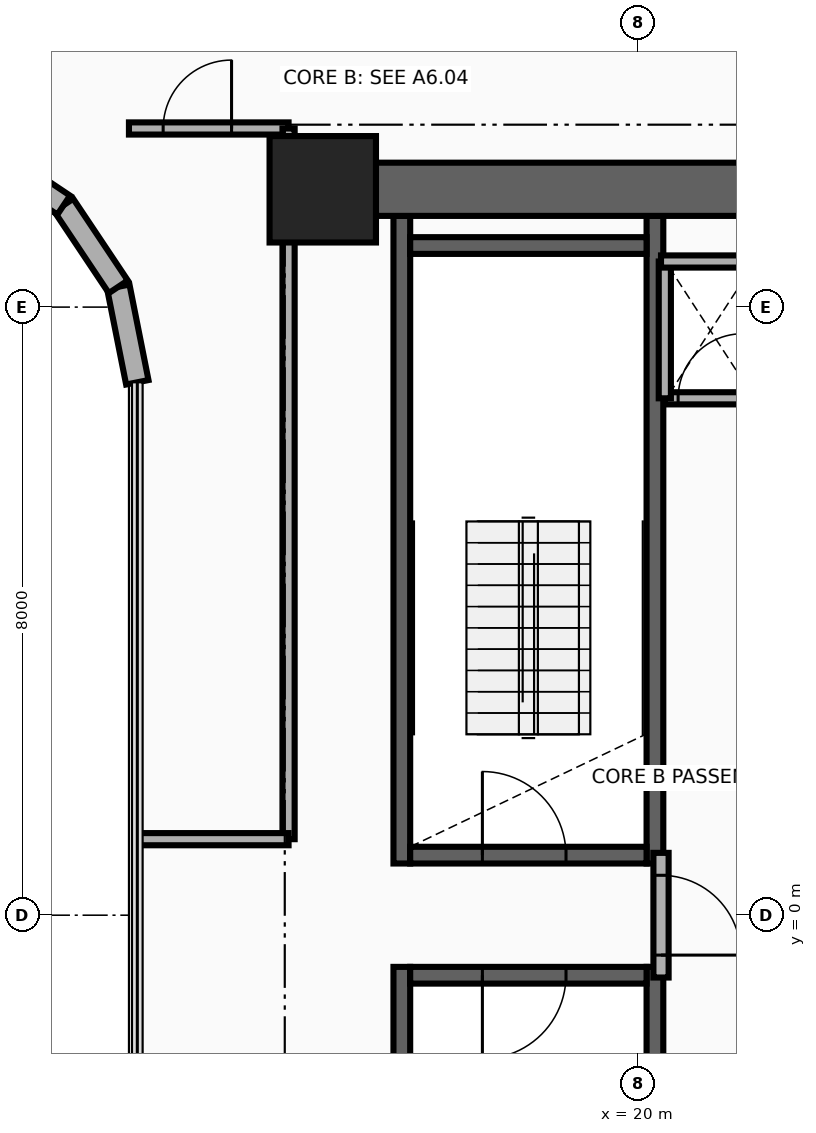
"""IFC4 building model, lengths in metres.
Left out: names, types, materials, properties, quantities, classifications, styles, units other than length and angle.
Written with IfcOpenShell. Run it as: python <this file> out.ifc"""

import sys

from ifc_helpers import new_model, si_unit, direction, frame, frame_2d, origin, origin_2d, place, context, subcontext, project, spatial, rectangle, extrude, source, transform, mapped, element, fill, save


model = new_model("IFC4")
c1 = context("Model", 3, precision=1e-05, world=origin(), true_north=direction((0.0, 1.0)))
c2 = subcontext(c1, "Body", "Model", "MODEL_VIEW")
j1 = project(units=[si_unit("LENGTHUNIT", "METRE"), si_unit("PLANEANGLEUNIT", "RADIAN")], contexts=[c1])
p1 = place(None, origin())
s1 = spatial("IfcSite", under=j1, at=p1, CompositionType="ELEMENT")
p2 = place(p1, origin())
s2 = spatial("IfcBuilding", under=s1, at=p2, CompositionType="ELEMENT")
p3 = place(p2, frame((0.0, 0.0, 37.1)))
s3 = spatial("IfcBuildingStorey", under=s2, at=p3, CompositionType="ELEMENT", Elevation=37.1)
for number, where, z_axis, x_axis in (
    (1, (16.89, 0.68, 0.0), (0.0, 0.0, 1.0), (0.0, 1.0, 0.0)),
    (2, (20.22, 0.68, 0.0), (0.0, 0.0, 1.0), (0.0, 1.0, 0.0)),
):
    element("IfcWall", number, at=place(p3, frame(where, z_axis=z_axis, x_axis=x_axis)), inside=s3, PredefinedType="SHEAR", context=c2, shape_type="SweptSolid", body=[
        extrude(rectangle(XDim=8.52, YDim=0.22, at=frame_2d((4.26, 0.0))), origin(), (0.0, 0.0, 1.0), 3.46),
    ])
p4 = place(p3, frame((17.0, 0.79, 0.0), z_axis=(0.0, 0.0, 1.0), x_axis=(1.0, 0.0, 0.0)))
e3 = element("IfcWall", 3, at=p4, inside=s3, PredefinedType="SHEAR", context=c2, shape_type="SweptSolid", body=[
    extrude(rectangle(XDim=3.11, YDim=0.22, at=frame_2d((1.555, 0.0))), origin(), (0.0, 0.0, 1.0), 3.46),
])
p5 = place(p4, frame((0.95, 0.0, 0.0)))
e4 = element("IfcOpeningElement", 4, at=p5, cuts=e3, PredefinedType="OPENING", context=c2, shape_type="SweptSolid", body=[
    extrude(rectangle(XDim=1.1, YDim=2.15, at=frame_2d((0.55, 1.075))), frame((0.0, 0.125, 0.0), z_axis=(0.0, -1.0, 0.0), x_axis=(1.0, 0.0, 0.0)), (0.0, 0.0, 1.0), 0.25),
])
p6 = place(p3, frame((17.0, 8.81, 0.0), z_axis=(0.0, 0.0, 1.0), x_axis=(1.0, 0.0, 0.0)))
e5 = element("IfcWall", 5, at=p6, inside=s3, PredefinedType="SHEAR", context=c2, shape_type="SweptSolid", body=[
    extrude(rectangle(XDim=3.11, YDim=0.22, at=frame_2d((1.555, 0.0))), origin(), (0.0, 0.0, 1.0), 3.46),
])
for number, where, z_axis, x_axis in (
    (6, (16.89, -9.2, 0.0), (0.0, 0.0, 1.0), (0.0, 1.0, 0.0)),
    (7, (20.22, -9.2, 0.0), (0.0, 0.0, 1.0), (0.0, 1.0, 0.0)),
):
    element("IfcWall", number, at=place(p3, frame(where, z_axis=z_axis, x_axis=x_axis)), inside=s3, PredefinedType="SHEAR", context=c2, shape_type="SweptSolid", body=[
        extrude(rectangle(XDim=8.52, YDim=0.22, at=frame_2d((4.26, 0.0))), origin(), (0.0, 0.0, 1.0), 3.46),
    ])
p7 = place(p3, frame((17.0, -0.79, 0.0), z_axis=(0.0, 0.0, 1.0), x_axis=(1.0, 0.0, 0.0)))
e8 = element("IfcWall", 8, at=p7, inside=s3, PredefinedType="SHEAR", context=c2, shape_type="SweptSolid", body=[
    extrude(rectangle(XDim=3.11, YDim=0.22, at=frame_2d((1.555, 0.0))), origin(), (0.0, 0.0, 1.0), 3.46),
])
p8 = place(p7, frame((0.95, 0.0, 0.0)))
e9 = element("IfcOpeningElement", 9, at=p8, cuts=e8, PredefinedType="OPENING", context=c2, shape_type="SweptSolid", body=[
    extrude(rectangle(XDim=1.1, YDim=2.15, at=frame_2d((0.55, 1.075))), frame((0.0, 0.125, 0.0), z_axis=(0.0, -1.0, 0.0), x_axis=(1.0, 0.0, 0.0)), (0.0, 0.0, 1.0), 0.25),
])
p9 = place(p3, frame((15.85, 9.55, 0.0), z_axis=(0.0, 0.0, 1.0), x_axis=(1.0, 0.0, 0.0)))
e10 = element("IfcWall", 10, at=p9, inside=s3, PredefinedType="SHEAR", context=c2, shape_type="SweptSolid", body=[
    extrude(rectangle(XDim=9.0, YDim=0.7, at=frame_2d((4.5, 0.0))), origin(), (0.0, 0.0, 1.0), 3.46),
])
m1 = source(origin(), c2, "Body", "SweptSolid", [
    extrude(rectangle(XDim=1.4, YDim=1.4, at=origin_2d()), origin(), (0.0, 0.0, 1.0), 3.7),
])
p10 = place(p3, frame((15.85, 9.55, 0.0), z_axis=(0.0, 0.0, 1.0), x_axis=(1.0, 0.0, 0.0)))
e11 = element("IfcColumn", 11, at=p10, inside=s3, PredefinedType="COLUMN", context=c2, shape_type="MappedRepresentation", body=[
    mapped(m1, transform((0.0, 0.0, 0.0), x_axis=(1.0, 0.0, 0.0), y_axis=(0.0, 1.0, 0.0), z_axis=(0.0, 0.0, 1.0), scale=1.0)),
])
p11 = place(p3, frame((13.41, 7.011, 0.0), z_axis=(0.0, 0.0, 1.0), x_axis=(-0.195090163074, 0.980785312019, 0.0)))
e12 = element("IfcWall", 12, at=p11, inside=s3, PredefinedType="SOLIDWALL", context=c2, shape_type="SweptSolid", body=[
    extrude(rectangle(XDim=1.281, YDim=0.3, at=frame_2d((0.641, 0.0))), origin(), (0.0, 0.0, 1.0), 3.46),
])
for number, where, z_axis, x_axis in (
    (13, (13.16, 8.268, 0.0), (0.0, 0.0, 1.0), (-0.556, 0.831, 0.0)),
    (14, (12.442, 9.342, 0.0), (0.0, 0.0, 1.0), (-0.831, 0.556, 0.0)),
):
    element("IfcWall", number, at=place(p3, frame(where, z_axis=z_axis, x_axis=x_axis)), inside=s3, PredefinedType="SOLIDWALL", context=c2, shape_type="SweptSolid", body=[
        extrude(rectangle(XDim=1.292, YDim=0.3, at=frame_2d((0.646, 0.0))), origin(), (0.0, 0.0, 1.0), 3.46),
    ])
p12 = place(p3, frame((20.3, -0.82, 0.0), z_axis=(0.0, 0.0, 1.0), x_axis=(0.0, 1.0, 0.0)))
e15 = element("IfcWall", 15, at=p12, inside=s3, PredefinedType="PARTITIONING", context=c2, shape_type="SweptSolid", body=[
    extrude(rectangle(XDim=1.64, YDim=0.2, at=frame_2d((0.82, 0.0))), origin(), (0.0, 0.0, 1.0), 3.46),
])
p13 = place(p12, frame((0.295, 0.0, 0.0)))
e16 = element("IfcOpeningElement", 16, at=p13, cuts=e15, PredefinedType="OPENING", context=c2, shape_type="SweptSolid", body=[
    extrude(rectangle(XDim=1.05, YDim=2.15, at=frame_2d((0.525, 1.075))), frame((0.0, 0.115, 0.0), z_axis=(0.0, -1.0, 0.0), x_axis=(1.0, 0.0, 0.0)), (0.0, 0.0, 1.0), 0.23),
])
p14 = place(p3, frame((20.35, 6.8, 0.0), z_axis=(0.0, 0.0, 1.0), x_axis=(1.0, 0.0, 0.0)))
e17 = element("IfcWall", 17, at=p14, inside=s3, PredefinedType="PARTITIONING", context=c2, shape_type="SweptSolid", body=[
    extrude(rectangle(XDim=1.2, YDim=0.16, at=frame_2d((0.6, 0.0))), origin(), (0.0, 0.0, 1.0), 3.46),
])
p15 = place(p14, frame((0.175, 0.0, 0.0)))
e18 = element("IfcOpeningElement", 18, at=p15, cuts=e17, PredefinedType="OPENING", context=c2, shape_type="SweptSolid", body=[
    extrude(rectangle(XDim=0.85, YDim=2.05, at=frame_2d((0.425, 1.025))), frame((0.0, 0.095, 0.0), z_axis=(0.0, -1.0, 0.0), x_axis=(1.0, 0.0, 0.0)), (0.0, 0.0, 1.0), 0.19),
])
p16 = place(p3, frame((20.35, 6.8, 0.0), z_axis=(0.0, 0.0, 1.0), x_axis=(0.0, 1.0, 0.0)))
e19 = element("IfcWall", 19, at=p16, inside=s3, PredefinedType="PARTITIONING", context=c2, shape_type="SweptSolid", body=[
    extrude(rectangle(XDim=1.8, YDim=0.16, at=frame_2d((0.9, 0.0))), origin(), (0.0, 0.0, 1.0), 3.46),
])
p17 = place(p3, frame((20.3, 8.6, 0.0), z_axis=(0.0, 0.0, 1.0), x_axis=(1.0, 0.0, 0.0)))
e20 = element("IfcWall", 20, at=p17, inside=s3, PredefinedType="PARTITIONING", context=c2, shape_type="SweptSolid", body=[
    extrude(rectangle(XDim=1.82, YDim=0.16, at=frame_2d((0.91, 0.0))), origin(), (0.0, 0.0, 1.0), 3.46),
])
p18 = place(p3, frame((13.3, 10.35, 0.0), z_axis=(0.0, 0.0, 1.0), x_axis=(1.0, 0.0, 0.0)))
e21 = element("IfcWall", 21, at=p18, inside=s3, PredefinedType="PARTITIONING", context=c2, shape_type="SweptSolid", body=[
    extrude(rectangle(XDim=2.1, YDim=0.16, at=frame_2d((1.05, 0.0))), origin(), (0.0, 0.0, 1.0), 2.583),
])
p19 = place(p18, frame((0.45, 0.0, 0.0)))
e22 = element("IfcOpeningElement", 22, at=p19, cuts=e21, PredefinedType="OPENING", context=c2, shape_type="SweptSolid", body=[
    extrude(rectangle(XDim=0.9, YDim=2.1, at=frame_2d((0.45, 1.05))), frame((0.0, 0.095, 0.0), z_axis=(0.0, -1.0, 0.0), x_axis=(1.0, 0.0, 0.0)), (0.0, 0.0, 1.0), 0.19),
])
p20 = place(p3, frame((15.4, 1.0, 0.0), z_axis=(0.0, 0.0, 1.0), x_axis=(0.0, 1.0, 0.0)))
e23 = element("IfcWall", 23, at=p20, inside=s3, PredefinedType="PARTITIONING", context=c2, shape_type="SweptSolid", body=[
    extrude(rectangle(XDim=9.35, YDim=0.16, at=frame_2d((4.675, 0.0))), origin(), (0.0, 0.0, 1.0), 2.245),
])
p21 = place(p3, frame((13.41, 1.0, 0.0), z_axis=(0.0, 0.0, 1.0), x_axis=(1.0, 0.0, 0.0)))
e24 = element("IfcWall", 24, at=p21, inside=s3, PredefinedType="PARTITIONING", context=c2, shape_type="SweptSolid", body=[
    extrude(rectangle(XDim=1.99, YDim=0.16, at=frame_2d((0.995, 0.0))), origin(), (0.0, 0.0, 1.0), 2.245),
])
p22 = place(p13, frame((1.05, 0.0, 0.0), z_axis=(0.0, 0.0, 1.0), x_axis=(-1.0, 0.0, 0.0)))
e25 = element("IfcDoor", 25, at=p22, inside=s3, OperationType="SINGLE_SWING_LEFT", PredefinedType="DOOR", context=c2, shape_type="SweptSolid", body=[
    extrude(rectangle(XDim=1.05, YDim=2.15, at=frame_2d((0.525, 1.075))), frame((0.0, 0.025, 0.0), z_axis=(0.0, -1.0, 0.0), x_axis=(1.0, 0.0, 0.0)), (0.0, 0.0, 1.0), 0.05),
])
fill(e16, e25)
p23 = place(p5, origin())
e26 = element("IfcDoor", 26, at=p23, inside=s3, OperationType="SINGLE_SWING_RIGHT", PredefinedType="DOOR", context=c2, shape_type="SweptSolid", body=[
    extrude(rectangle(XDim=1.1, YDim=2.15, at=frame_2d((0.55, 1.075))), frame((0.0, 0.025, 0.0), z_axis=(0.0, -1.0, 0.0), x_axis=(1.0, 0.0, 0.0)), (0.0, 0.0, 1.0), 0.05),
])
fill(e4, e26)
p24 = place(p8, frame((1.1, 0.0, 0.0), z_axis=(0.0, 0.0, 1.0), x_axis=(-1.0, 0.0, 0.0)))
e27 = element("IfcDoor", 27, at=p24, inside=s3, OperationType="SINGLE_SWING_LEFT", PredefinedType="DOOR", context=c2, shape_type="SweptSolid", body=[
    extrude(rectangle(XDim=1.1, YDim=2.15, at=frame_2d((0.55, 1.075))), frame((0.0, 0.025, 0.0), z_axis=(0.0, -1.0, 0.0), x_axis=(1.0, 0.0, 0.0)), (0.0, 0.0, 1.0), 0.05),
])
fill(e9, e27)
p25 = place(p15, origin())
e28 = element("IfcDoor", 28, at=p25, inside=s3, OperationType="SINGLE_SWING_RIGHT", PredefinedType="DOOR", context=c2, shape_type="SweptSolid", body=[
    extrude(rectangle(XDim=0.85, YDim=2.05, at=frame_2d((0.425, 1.025))), frame((0.0, 0.025, 0.0), z_axis=(0.0, -1.0, 0.0), x_axis=(1.0, 0.0, 0.0)), (0.0, 0.0, 1.0), 0.05),
])
fill(e18, e28)
p26 = place(p19, origin())
e29 = element("IfcDoor", 29, at=p26, inside=s3, OperationType="SINGLE_SWING_RIGHT", PredefinedType="DOOR", context=c2, shape_type="SweptSolid", body=[
    extrude(rectangle(XDim=0.9, YDim=2.1, at=frame_2d((0.45, 1.05))), frame((0.0, 0.025, 0.0), z_axis=(0.0, -1.0, 0.0), x_axis=(1.0, 0.0, 0.0)), (0.0, 0.0, 1.0), 0.05),
])
fill(e22, e29)
save(model, sys.argv[1])
